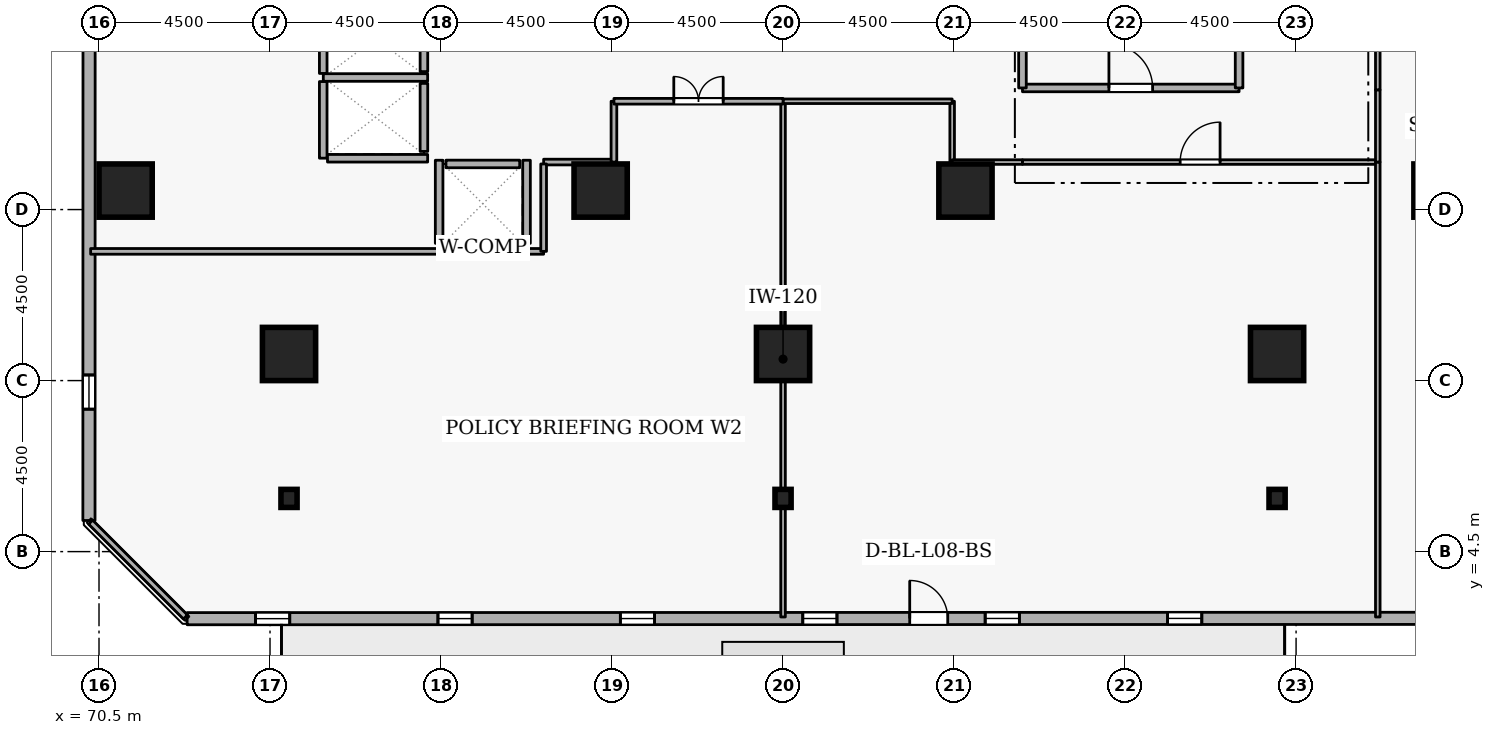
"""IFC4 building model, lengths in metres.
Left out: names, types, materials, properties, quantities, classifications, styles, units other than length and angle.
Written with IfcOpenShell. Run it as: python <this file> out.ifc"""

import sys

from ifc_helpers import new_model, si_unit, direction, frame, frame_2d, origin, origin_2d, place, context, subcontext, project, spatial, rectangle, i_section, extrude, element, fill, save


model = new_model("IFC4")
c1 = context("Model", 3, precision=1e-05, world=origin(), true_north=direction((0.0, 1.0)))
c2 = subcontext(c1, "Body", "Model", "MODEL_VIEW")
j1 = project(units=[si_unit("LENGTHUNIT", "METRE"), si_unit("PLANEANGLEUNIT", "RADIAN")], contexts=[c1])
p1 = place(None, origin())
s1 = spatial("IfcSite", under=j1, at=p1, CompositionType="ELEMENT")
p2 = place(p1, origin())
s2 = spatial("IfcBuilding", under=s1, at=p2, CompositionType="ELEMENT")
p3 = place(p2, frame((0.0, 0.0, 35.1)))
s3 = spatial("IfcBuildingStorey", under=s2, at=p3, CompositionType="ELEMENT", Elevation=35.1)
for number, where, z_axis, x_axis in (
    (1, (105.8, 14.0, 0.0), (0.0, 0.0, 1.0), (1.0, 0.0, 0.0)),
    (2, (71.2, 14.0, 0.0), (0.0, 0.0, 1.0), (1.0, 0.0, 0.0)),
    (3, (101.5, 9.7, 0.0), (0.0, 0.0, 1.0), (1.0, 0.0, 0.0)),
    (4, (88.5, 9.7, 0.0), (0.0, 0.0, 1.0), (1.0, 0.0, 0.0)),
    (5, (75.5, 9.7, 0.0), (0.0, 0.0, 1.0), (1.0, 0.0, 0.0)),
    (6, (93.3, 14.0, 0.0), (0.0, 0.0, 1.0), (1.0, 0.0, 0.0)),
    (7, (83.7, 14.0, 0.0), (0.0, 0.0, 1.0), (1.0, 0.0, 0.0)),
):
    element("IfcColumn", number, at=place(p3, frame(where, z_axis=z_axis, x_axis=x_axis)), inside=s3, PredefinedType="COLUMN", context=c2, shape_type="SweptSolid", body=[
        extrude(rectangle(XDim=1.4, YDim=1.4, at=origin_2d()), origin(), (0.0, 0.0, 1.0), 3.6),
    ])
for number, where, z_axis, x_axis in (
    (8, (101.5, 5.9, 0.0), (0.0, 0.0, 1.0), (1.0, 0.0, 0.0)),
    (9, (88.5, 5.9, 0.0), (0.0, 0.0, 1.0), (1.0, 0.0, 0.0)),
    (10, (75.5, 5.9, 0.0), (0.0, 0.0, 1.0), (1.0, 0.0, 0.0)),
):
    element("IfcColumn", number, at=place(p3, frame(where, z_axis=z_axis, x_axis=x_axis)), inside=s3, PredefinedType="COLUMN", context=c2, shape_type="SweptSolid", body=[
        extrude(i_section(OverallWidth=0.424, OverallDepth=0.475, WebThickness=0.048, FlangeThickness=0.077, FilletRadius=0.015, at=origin_2d()), origin(), (0.0, 0.0, 1.0), 3.6),
    ])
p4 = place(p3, frame((72.819, 2.735, 0.0), z_axis=(0.0, 0.0, 1.0), x_axis=(0.999999961759, 0.000276554545, 0.0)))
e11 = element("IfcWall", 11, at=p4, inside=s3, PredefinedType="STANDARD", context=c2, shape_type="SweptSolid", body=[
    extrude(rectangle(XDim=34.429, YDim=0.32, at=frame_2d((17.214, 0.0))), origin(), (0.0, 0.0, 1.0), 2.7),
])
p5 = place(p4, frame((19.014, 0.0, 0.0)))
e12 = element("IfcOpeningElement", 12, at=p5, cuts=e11, PredefinedType="OPENING", context=c2, shape_type="SweptSolid", body=[
    extrude(rectangle(XDim=1.0, YDim=2.08, at=frame_2d((0.5, 1.04))), frame((0.0, 0.17, 0.0), z_axis=(0.0, -1.0, 0.0), x_axis=(1.0, 0.0, 0.0)), (0.0, 0.0, 1.0), 0.34),
])
p6 = place(p4, frame((1.8, 0.0, 0.72)))
e13 = element("IfcOpeningElement", 13, at=p6, cuts=e11, PredefinedType="OPENING", context=c2, shape_type="SweptSolid", body=[
    extrude(rectangle(XDim=0.9, YDim=1.75, at=frame_2d((0.45, 0.875))), frame((0.0, 0.17, 0.0), z_axis=(0.0, -1.0, 0.0), x_axis=(1.0, 0.0, 0.0)), (0.0, 0.0, 1.0), 0.34),
])
p7 = place(p4, frame((6.6, 0.0, 0.72)))
e14 = element("IfcOpeningElement", 14, at=p7, cuts=e11, PredefinedType="OPENING", context=c2, shape_type="SweptSolid", body=[
    extrude(rectangle(XDim=0.9, YDim=1.75, at=frame_2d((0.45, 0.875))), frame((0.0, 0.17, 0.0), z_axis=(0.0, -1.0, 0.0), x_axis=(1.0, 0.0, 0.0)), (0.0, 0.0, 1.0), 0.34),
])
p8 = place(p4, frame((11.4, 0.0, 0.72)))
e15 = element("IfcOpeningElement", 15, at=p8, cuts=e11, PredefinedType="OPENING", context=c2, shape_type="SweptSolid", body=[
    extrude(rectangle(XDim=0.9, YDim=1.75, at=frame_2d((0.45, 0.875))), frame((0.0, 0.17, 0.0), z_axis=(0.0, -1.0, 0.0), x_axis=(1.0, 0.0, 0.0)), (0.0, 0.0, 1.0), 0.34),
])
p9 = place(p4, frame((16.2, 0.0, 0.72)))
e16 = element("IfcOpeningElement", 16, at=p9, cuts=e11, PredefinedType="OPENING", context=c2, shape_type="SweptSolid", body=[
    extrude(rectangle(XDim=0.9, YDim=1.75, at=frame_2d((0.45, 0.875))), frame((0.0, 0.17, 0.0), z_axis=(0.0, -1.0, 0.0), x_axis=(1.0, 0.0, 0.0)), (0.0, 0.0, 1.0), 0.34),
])
p10 = place(p4, frame((21.0, 0.0, 0.72)))
e17 = element("IfcOpeningElement", 17, at=p10, cuts=e11, PredefinedType="OPENING", context=c2, shape_type="SweptSolid", body=[
    extrude(rectangle(XDim=0.9, YDim=1.75, at=frame_2d((0.45, 0.875))), frame((0.0, 0.17, 0.0), z_axis=(0.0, -1.0, 0.0), x_axis=(1.0, 0.0, 0.0)), (0.0, 0.0, 1.0), 0.34),
])
p11 = place(p4, frame((25.8, 0.0, 0.72)))
e18 = element("IfcOpeningElement", 18, at=p11, cuts=e11, PredefinedType="OPENING", context=c2, shape_type="SweptSolid", body=[
    extrude(rectangle(XDim=0.9, YDim=1.75, at=frame_2d((0.45, 0.875))), frame((0.0, 0.17, 0.0), z_axis=(0.0, -1.0, 0.0), x_axis=(1.0, 0.0, 0.0)), (0.0, 0.0, 1.0), 0.34),
])
p12 = place(p3, frame((70.245, 39.748, 0.0), z_axis=(0.0, 0.0, 1.0), x_axis=(-0.000276554545, -0.999999961759, 0.0)))
e19 = element("IfcWall", 19, at=p12, inside=s3, PredefinedType="STANDARD", context=c2, shape_type="SweptSolid", body=[
    extrude(rectangle(XDim=34.429, YDim=0.32, at=frame_2d((17.214, 0.0))), origin(), (0.0, 0.0, 1.0), 2.7),
])
p13 = place(p12, frame((6.6, 0.0, 0.72)))
e20 = element("IfcOpeningElement", 20, at=p13, cuts=e19, PredefinedType="OPENING", context=c2, shape_type="SweptSolid", body=[
    extrude(rectangle(XDim=0.9, YDim=1.75, at=frame_2d((0.45, 0.875))), frame((0.0, 0.17, 0.0), z_axis=(0.0, -1.0, 0.0), x_axis=(1.0, 0.0, 0.0)), (0.0, 0.0, 1.0), 0.34),
])
p14 = place(p12, frame((16.2, 0.0, 0.72)))
e21 = element("IfcOpeningElement", 21, at=p14, cuts=e19, PredefinedType="OPENING", context=c2, shape_type="SweptSolid", body=[
    extrude(rectangle(XDim=0.9, YDim=1.75, at=frame_2d((0.45, 0.875))), frame((0.0, 0.17, 0.0), z_axis=(0.0, -1.0, 0.0), x_axis=(1.0, 0.0, 0.0)), (0.0, 0.0, 1.0), 0.34),
])
p15 = place(p12, frame((21.0, 0.0, 0.72)))
e22 = element("IfcOpeningElement", 22, at=p15, cuts=e19, PredefinedType="OPENING", context=c2, shape_type="SweptSolid", body=[
    extrude(rectangle(XDim=0.9, YDim=1.75, at=frame_2d((0.45, 0.875))), frame((0.0, 0.17, 0.0), z_axis=(0.0, -1.0, 0.0), x_axis=(1.0, 0.0, 0.0)), (0.0, 0.0, 1.0), 0.34),
])
p16 = place(p12, frame((30.6, 0.0, 0.72)))
e23 = element("IfcOpeningElement", 23, at=p16, cuts=e19, PredefinedType="OPENING", context=c2, shape_type="SweptSolid", body=[
    extrude(rectangle(XDim=0.9, YDim=1.75, at=frame_2d((0.45, 0.875))), frame((0.0, 0.17, 0.0), z_axis=(0.0, -1.0, 0.0), x_axis=(1.0, 0.0, 0.0)), (0.0, 0.0, 1.0), 0.34),
])
p17 = place(p3, frame((79.05, 17.13, 0.0), z_axis=(0.0, 0.0, 1.0), x_axis=(0.0, 1.0, 0.0)))
e24 = element("IfcWall", 24, at=p17, inside=s3, PredefinedType="STANDARD", context=c2, shape_type="SweptSolid", body=[
    extrude(rectangle(XDim=1.74, YDim=0.2, at=frame_2d((0.87, 0.0))), origin(), (0.0, 0.0, 1.0), 3.34),
])
p18 = place(p3, frame((79.05, 15.03, 0.0), z_axis=(0.0, 0.0, 1.0), x_axis=(0.0, 1.0, 0.0)))
e25 = element("IfcWall", 25, at=p18, inside=s3, PredefinedType="STANDARD", context=c2, shape_type="SweptSolid", body=[
    extrude(rectangle(XDim=1.79, YDim=0.2, at=frame_2d((0.895, 0.0))), origin(), (0.0, 0.0, 1.0), 3.34),
])
p19 = place(p3, frame((79.63, 14.7, 0.0), z_axis=(0.0, 0.0, 1.0), x_axis=(1.0, 0.0, 0.0)))
e26 = element("IfcWall", 26, at=p19, inside=s3, PredefinedType="STANDARD", context=c2, shape_type="SweptSolid", body=[
    extrude(rectangle(XDim=1.94, YDim=0.2, at=frame_2d((0.97, 0.0))), origin(), (0.0, 0.0, 1.0), 3.34),
])
p20 = place(p3, frame((76.402, 16.975, 0.0), z_axis=(0.0, 0.0, 1.0), x_axis=(1.0, 0.0, 0.0)))
e27 = element("IfcWall", 27, at=p20, inside=s3, PredefinedType="STANDARD", context=c2, shape_type="SweptSolid", body=[
    extrude(rectangle(XDim=2.746, YDim=0.2, at=frame_2d((1.373, 0.0))), origin(), (0.0, 0.0, 1.0), 3.34),
])
p21 = place(p3, frame((76.4, 14.852, 0.0), z_axis=(0.0, 0.0, 1.0), x_axis=(0.0, 1.0, 0.0)))
e28 = element("IfcWall", 28, at=p21, inside=s3, PredefinedType="STANDARD", context=c2, shape_type="SweptSolid", body=[
    extrude(rectangle(XDim=2.016, YDim=0.2, at=frame_2d((1.008, 0.0))), origin(), (0.0, 0.0, 1.0), 3.34),
])
p22 = place(p3, frame((76.4, 17.082, 0.0), z_axis=(0.0, 0.0, 1.0), x_axis=(0.0, 1.0, 0.0)))
e29 = element("IfcWall", 29, at=p22, inside=s3, PredefinedType="STANDARD", context=c2, shape_type="SweptSolid", body=[
    extrude(rectangle(XDim=1.856, YDim=0.2, at=frame_2d((0.928, 0.0))), origin(), (0.0, 0.0, 1.0), 3.34),
])
p23 = place(p3, frame((76.512, 14.85, 0.0), z_axis=(0.0, 0.0, 1.0), x_axis=(1.0, 0.0, 0.0)))
e30 = element("IfcWall", 30, at=p23, inside=s3, PredefinedType="STANDARD", context=c2, shape_type="SweptSolid", body=[
    extrude(rectangle(XDim=2.636, YDim=0.2, at=frame_2d((1.318, 0.0))), origin(), (0.0, 0.0, 1.0), 3.34),
])
p24 = place(p3, frame((79.452, 12.5, 0.0), z_axis=(0.0, 0.0, 1.0), x_axis=(1.0, 0.0, 0.0)))
e31 = element("IfcWall", 31, at=p24, inside=s3, PredefinedType="STANDARD", context=c2, shape_type="SweptSolid", body=[
    extrude(rectangle(XDim=2.296, YDim=0.2, at=frame_2d((1.148, 0.0))), origin(), (0.0, 0.0, 1.0), 3.34),
])
for number, where, z_axis, x_axis in (
    (32, (81.75, 12.612, 0.0), (0.0, 0.0, 1.0), (0.0, 1.0, 0.0)),
    (33, (79.45, 12.612, 0.0), (0.0, 0.0, 1.0), (0.0, 1.0, 0.0)),
):
    element("IfcWall", number, at=place(p3, frame(where, z_axis=z_axis, x_axis=x_axis)), inside=s3, PredefinedType="STANDARD", context=c2, shape_type="SweptSolid", body=[
        extrude(rectangle(XDim=2.186, YDim=0.2, at=frame_2d((1.093, 0.0))), origin(), (0.0, 0.0, 1.0), 3.34),
    ])
p25 = place(p3, frame((94.8, 16.7, 0.0), z_axis=(0.0, 0.0, 1.0), x_axis=(1.0, 0.0, 0.0)))
e34 = element("IfcWall", 34, at=p25, inside=s3, PredefinedType="STANDARD", context=c2, shape_type="SweptSolid", body=[
    extrude(rectangle(XDim=5.7, YDim=0.2, at=frame_2d((2.85, 0.0))), origin(), (0.0, 0.0, 1.0), 3.34),
])
p26 = place(p25, frame((2.275, 0.0, 0.0)))
e35 = element("IfcOpeningElement", 35, at=p26, cuts=e34, PredefinedType="OPENING", context=c2, shape_type="SweptSolid", body=[
    extrude(rectangle(XDim=1.15, YDim=2.1, at=frame_2d((0.575, 1.05))), frame((0.0, 0.11, 0.0), z_axis=(0.0, -1.0, 0.0), x_axis=(1.0, 0.0, 0.0)), (0.0, 0.0, 1.0), 0.22),
])
for number, where, z_axis, x_axis in (
    (36, (100.5, 16.7, 0.0), (0.0, 0.0, 1.0), (0.0, 1.0, 0.0)),
    (37, (94.8, 19.2, 0.0), (0.0, 0.0, 1.0), (0.0, -1.0, 0.0)),
):
    element("IfcWall", number, at=place(p3, frame(where, z_axis=z_axis, x_axis=x_axis)), inside=s3, PredefinedType="STANDARD", context=c2, shape_type="SweptSolid", body=[
        extrude(rectangle(XDim=2.5, YDim=0.2, at=frame_2d((1.25, 0.0))), origin(), (0.0, 0.0, 1.0), 3.34),
    ])
p27 = place(p3, frame((92.95, 16.35, 0.0), z_axis=(0.0, 0.0, 1.0), x_axis=(0.0, -1.0, 0.0)))
e38 = element("IfcWall", 38, at=p27, inside=s3, PredefinedType="PARTITIONING", context=c2, shape_type="SweptSolid", body=[
    extrude(rectangle(XDim=1.6, YDim=0.12, at=frame_2d((0.8, 0.0))), origin(), (0.0, 0.0, 1.0), 3.34),
])
p28 = place(p3, frame((92.95, 14.75, 0.0), z_axis=(0.0, 0.0, 1.0), x_axis=(1.0, 0.0, 0.0)))
e39 = element("IfcWall", 39, at=p28, inside=s3, PredefinedType="PARTITIONING", context=c2, shape_type="SweptSolid", body=[
    extrude(rectangle(XDim=1.85, YDim=0.12, at=frame_2d((0.925, 0.0))), origin(), (0.0, 0.0, 1.0), 3.34),
])
p29 = place(p3, frame((94.8, 14.75, 0.0), z_axis=(0.0, 0.0, 1.0), x_axis=(1.0, 0.0, 0.0)))
e40 = element("IfcWall", 40, at=p29, inside=s3, PredefinedType="PARTITIONING", context=c2, shape_type="SweptSolid", body=[
    extrude(rectangle(XDim=9.35, YDim=0.12, at=frame_2d((4.675, 0.0))), origin(), (0.0, 0.0, 1.0), 3.34),
])
p30 = place(p29, frame((4.15, 0.0, 0.0)))
e41 = element("IfcOpeningElement", 41, at=p30, cuts=e40, PredefinedType="OPENING", context=c2, shape_type="SweptSolid", body=[
    extrude(rectangle(XDim=1.05, YDim=2.1, at=frame_2d((0.525, 1.05))), frame((0.0, 0.07, 0.0), z_axis=(0.0, -1.0, 0.0), x_axis=(1.0, 0.0, 0.0)), (0.0, 0.0, 1.0), 0.14),
])
p31 = place(p3, frame((104.15, 14.75, 0.0), z_axis=(0.0, 0.0, 1.0), x_axis=(0.0, -1.0, 0.0)))
e42 = element("IfcWall", 42, at=p31, inside=s3, PredefinedType="PARTITIONING", context=c2, shape_type="SweptSolid", body=[
    extrude(rectangle(XDim=11.97, YDim=0.12, at=frame_2d((5.985, 0.0))), origin(), (0.0, 0.0, 1.0), 3.34),
])
p32 = place(p3, frame((88.5, 2.78, 0.0), z_axis=(0.0, 0.0, 1.0), x_axis=(0.0, 1.0, 0.0)))
e43 = element("IfcWall", 43, at=p32, inside=s3, PredefinedType="PARTITIONING", context=c2, shape_type="SweptSolid", body=[
    extrude(rectangle(XDim=13.57, YDim=0.12, at=frame_2d((6.785, 0.0))), origin(), (0.0, 0.0, 1.0), 2.878),
])
p33 = place(p3, frame((88.5, 16.35, 0.0), z_axis=(0.0, 0.0, 1.0), x_axis=(1.0, 0.0, 0.0)))
e44 = element("IfcWall", 44, at=p33, inside=s3, PredefinedType="PARTITIONING", context=c2, shape_type="SweptSolid", body=[
    extrude(rectangle(XDim=4.45, YDim=0.12, at=frame_2d((2.225, 0.0))), origin(), (0.0, 0.0, 1.0), 3.34),
])
p34 = place(p3, frame((82.2, 14.75, 0.0), z_axis=(0.0, 0.0, 1.0), x_axis=(1.0, 0.0, 0.0)))
e45 = element("IfcWall", 45, at=p34, inside=s3, PredefinedType="PARTITIONING", context=c2, shape_type="SweptSolid", body=[
    extrude(rectangle(XDim=1.85, YDim=0.15, at=frame_2d((0.925, 0.0))), origin(), (0.0, 0.0, 1.0), 3.34),
])
p35 = place(p3, frame((84.05, 14.75, 0.0), z_axis=(0.0, 0.0, 1.0), x_axis=(0.0, 1.0, 0.0)))
e46 = element("IfcWall", 46, at=p35, inside=s3, PredefinedType="PARTITIONING", context=c2, shape_type="SweptSolid", body=[
    extrude(rectangle(XDim=1.6, YDim=0.15, at=frame_2d((0.8, 0.0))), origin(), (0.0, 0.0, 1.0), 3.34),
])
p36 = place(p3, frame((84.05, 16.35, 0.0), z_axis=(0.0, 0.0, 1.0), x_axis=(1.0, 0.0, 0.0)))
e47 = element("IfcWall", 47, at=p36, inside=s3, PredefinedType="PARTITIONING", context=c2, shape_type="SweptSolid", body=[
    extrude(rectangle(XDim=4.45, YDim=0.15, at=frame_2d((2.225, 0.0))), origin(), (0.0, 0.0, 1.0), 3.34),
])
p37 = place(p36, frame((1.575, 0.0, 0.0)))
e48 = element("IfcOpeningElement", 48, at=p37, cuts=e47, PredefinedType="OPENING", context=c2, shape_type="SweptSolid", body=[
    extrude(rectangle(XDim=1.3, YDim=2.12, at=frame_2d((0.65, 1.06))), frame((0.0, 0.085, 0.0), z_axis=(0.0, -1.0, 0.0), x_axis=(1.0, 0.0, 0.0)), (0.0, 0.0, 1.0), 0.17),
])
p38 = place(p3, frame((72.775, 2.78, 0.0), z_axis=(0.0, 0.0, 1.0), x_axis=(-0.707106781187, 0.707106781187, 0.0)))
e49 = element("IfcWall", 49, at=p38, inside=s3, PredefinedType="PARTITIONING", context=c2, shape_type="SweptSolid", body=[
    extrude(rectangle(XDim=3.528, YDim=0.15, at=frame_2d((1.764, 0.0))), origin(), (0.0, 0.0, 1.0), 3.34),
])
p39 = place(p3, frame((70.28, 12.4, 0.0), z_axis=(0.0, 0.0, 1.0), x_axis=(1.0, 0.0, 0.0)))
e50 = element("IfcWall", 50, at=p39, inside=s3, PredefinedType="PARTITIONING", context=c2, shape_type="SweptSolid", body=[
    extrude(rectangle(XDim=9.172, YDim=0.15, at=frame_2d((4.586, 0.0))), origin(), (0.0, 0.0, 1.0), 3.34),
])
p40 = place(p3, frame((81.748, 12.4, 0.0), z_axis=(0.0, 0.0, 1.0), x_axis=(1.0, 0.0, 0.0)))
e51 = element("IfcWall", 51, at=p40, inside=s3, PredefinedType="PARTITIONING", context=c2, shape_type="SweptSolid", body=[
    extrude(rectangle(XDim=0.452, YDim=0.15, at=frame_2d((0.226, 0.0))), origin(), (0.0, 0.0, 1.0), 3.34),
])
p41 = place(p3, frame((82.2, 12.4, 0.0), z_axis=(0.0, 0.0, 1.0), x_axis=(0.0, 1.0, 0.0)))
e52 = element("IfcWall", 52, at=p41, inside=s3, PredefinedType="PARTITIONING", context=c2, shape_type="SweptSolid", body=[
    extrude(rectangle(XDim=2.3, YDim=0.15, at=frame_2d((1.15, 0.0))), origin(), (0.0, 0.0, 1.0), 3.34),
])
p42 = place(p3, frame((104.15, 14.75, 0.0), z_axis=(0.0, 0.0, 1.0), x_axis=(0.0, 1.0, 0.0)))
e53 = element("IfcWall", 53, at=p42, inside=s3, PredefinedType="PARTITIONING", context=c2, shape_type="SweptSolid", body=[
    extrude(rectangle(XDim=1.9, YDim=0.12, at=frame_2d((0.95, 0.0))), origin(), (0.0, 0.0, 1.0), 3.34),
])
p43 = place(p3, frame((104.15, 16.65, 0.0), z_axis=(0.0, 0.0, 1.0), x_axis=(0.0, 1.0, 0.0)))
e54 = element("IfcWall", 54, at=p43, inside=s3, PredefinedType="PARTITIONING", context=c2, shape_type="SweptSolid", body=[
    extrude(rectangle(XDim=10.35, YDim=0.12, at=frame_2d((5.175, 0.0))), origin(), (0.0, 0.0, 1.0), 3.34),
])
p44 = place(p43, frame((4.65, 0.0, 0.0)))
e55 = element("IfcOpeningElement", 55, at=p44, cuts=e54, PredefinedType="OPENING", context=c2, shape_type="SweptSolid", body=[
    extrude(rectangle(XDim=1.05, YDim=2.1, at=frame_2d((0.525, 1.05))), frame((0.0, 0.07, 0.0), z_axis=(0.0, -1.0, 0.0), x_axis=(1.0, 0.0, 0.0)), (0.0, 0.0, 1.0), 0.14),
])
p45 = place(p5, origin())
e56 = element("IfcDoor", 56, at=p45, inside=s3, OperationType="SINGLE_SWING_LEFT", PredefinedType="DOOR", context=c2, shape_type="SweptSolid", body=[
    extrude(rectangle(XDim=1.0, YDim=2.08, at=frame_2d((0.5, 1.04))), frame((0.0, 0.025, 0.0), z_axis=(0.0, -1.0, 0.0), x_axis=(1.0, 0.0, 0.0)), (0.0, 0.0, 1.0), 0.05),
])
fill(e12, e56)
p46 = place(p6, origin())
e57 = element("IfcWindow", 57, at=p46, inside=s3, PartitioningType="SINGLE_PANEL", PredefinedType="WINDOW", context=c2, shape_type="SweptSolid", body=[
    extrude(rectangle(XDim=0.9, YDim=1.75, at=frame_2d((0.45, 0.875))), frame((0.0, 0.03, 0.0), z_axis=(0.0, -1.0, 0.0), x_axis=(1.0, 0.0, 0.0)), (0.0, 0.0, 1.0), 0.06),
])
fill(e13, e57)
p47 = place(p7, origin())
e58 = element("IfcWindow", 58, at=p47, inside=s3, PartitioningType="SINGLE_PANEL", PredefinedType="WINDOW", context=c2, shape_type="SweptSolid", body=[
    extrude(rectangle(XDim=0.9, YDim=1.75, at=frame_2d((0.45, 0.875))), frame((0.0, 0.03, 0.0), z_axis=(0.0, -1.0, 0.0), x_axis=(1.0, 0.0, 0.0)), (0.0, 0.0, 1.0), 0.06),
])
fill(e14, e58)
p48 = place(p8, origin())
e59 = element("IfcWindow", 59, at=p48, inside=s3, PartitioningType="SINGLE_PANEL", PredefinedType="WINDOW", context=c2, shape_type="SweptSolid", body=[
    extrude(rectangle(XDim=0.9, YDim=1.75, at=frame_2d((0.45, 0.875))), frame((0.0, 0.03, 0.0), z_axis=(0.0, -1.0, 0.0), x_axis=(1.0, 0.0, 0.0)), (0.0, 0.0, 1.0), 0.06),
])
fill(e15, e59)
p49 = place(p9, origin())
e60 = element("IfcWindow", 60, at=p49, inside=s3, PartitioningType="SINGLE_PANEL", PredefinedType="WINDOW", context=c2, shape_type="SweptSolid", body=[
    extrude(rectangle(XDim=0.9, YDim=1.75, at=frame_2d((0.45, 0.875))), frame((0.0, 0.03, 0.0), z_axis=(0.0, -1.0, 0.0), x_axis=(1.0, 0.0, 0.0)), (0.0, 0.0, 1.0), 0.06),
])
fill(e16, e60)
p50 = place(p10, origin())
e61 = element("IfcWindow", 61, at=p50, inside=s3, PartitioningType="SINGLE_PANEL", PredefinedType="WINDOW", context=c2, shape_type="SweptSolid", body=[
    extrude(rectangle(XDim=0.9, YDim=1.75, at=frame_2d((0.45, 0.875))), frame((0.0, 0.03, 0.0), z_axis=(0.0, -1.0, 0.0), x_axis=(1.0, 0.0, 0.0)), (0.0, 0.0, 1.0), 0.06),
])
fill(e17, e61)
p51 = place(p11, origin())
e62 = element("IfcWindow", 62, at=p51, inside=s3, PartitioningType="SINGLE_PANEL", PredefinedType="WINDOW", context=c2, shape_type="SweptSolid", body=[
    extrude(rectangle(XDim=0.9, YDim=1.75, at=frame_2d((0.45, 0.875))), frame((0.0, 0.03, 0.0), z_axis=(0.0, -1.0, 0.0), x_axis=(1.0, 0.0, 0.0)), (0.0, 0.0, 1.0), 0.06),
])
fill(e18, e62)
p52 = place(p16, origin())
e63 = element("IfcWindow", 63, at=p52, inside=s3, PartitioningType="SINGLE_PANEL", PredefinedType="WINDOW", context=c2, shape_type="SweptSolid", body=[
    extrude(rectangle(XDim=0.9, YDim=1.75, at=frame_2d((0.45, 0.875))), frame((0.0, 0.03, 0.0), z_axis=(0.0, -1.0, 0.0), x_axis=(1.0, 0.0, 0.0)), (0.0, 0.0, 1.0), 0.06),
])
fill(e23, e63)
p53 = place(p26, origin())
e64 = element("IfcDoor", 64, at=p53, inside=s3, OperationType="SINGLE_SWING_LEFT", PredefinedType="DOOR", context=c2, shape_type="SweptSolid", body=[
    extrude(rectangle(XDim=1.15, YDim=2.1, at=frame_2d((0.575, 1.05))), frame((0.0, 0.025, 0.0), z_axis=(0.0, -1.0, 0.0), x_axis=(1.0, 0.0, 0.0)), (0.0, 0.0, 1.0), 0.05),
])
fill(e35, e64)
p54 = place(p30, origin())
e65 = element("IfcDoor", 65, at=p54, inside=s3, OperationType="SINGLE_SWING_RIGHT", PredefinedType="DOOR", context=c2, shape_type="SweptSolid", body=[
    extrude(rectangle(XDim=1.05, YDim=2.1, at=frame_2d((0.525, 1.05))), frame((0.0, 0.025, 0.0), z_axis=(0.0, -1.0, 0.0), x_axis=(1.0, 0.0, 0.0)), (0.0, 0.0, 1.0), 0.05),
])
fill(e41, e65)
p55 = place(p37, origin())
e66 = element("IfcDoor", 66, at=p55, inside=s3, OperationType="DOUBLE_DOOR_SINGLE_SWING", PredefinedType="DOOR", context=c2, shape_type="SweptSolid", body=[
    extrude(rectangle(XDim=1.3, YDim=2.12, at=frame_2d((0.65, 1.06))), frame((0.0, 0.025, 0.0), z_axis=(0.0, -1.0, 0.0), x_axis=(1.0, 0.0, 0.0)), (0.0, 0.0, 1.0), 0.05),
])
fill(e48, e66)
save(model, sys.argv[1])
